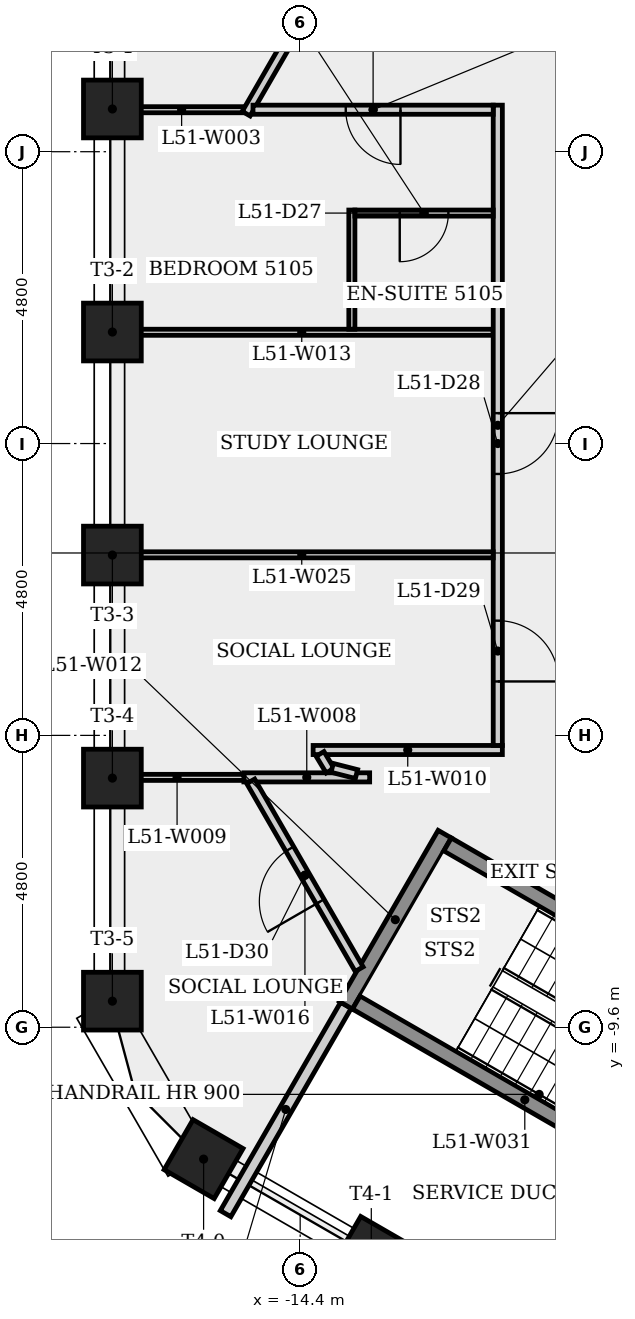
"""IFC4 building model, lengths in metres.
Left out: names, types, materials, properties, quantities, classifications, styles, units other than length and angle.
Written with IfcOpenShell. Run it as: python <this file> out.ifc"""

import sys

from ifc_helpers import new_model, si_unit, direction, frame, frame_2d, origin, origin_2d, place, context, subcontext, project, spatial, rectangle, extrude, element, fill, save


model = new_model("IFC4")
c1 = context("Model", 3, precision=1e-05, world=origin(), true_north=direction((0.0, 1.0)))
c2 = subcontext(c1, "Body", "Model", "MODEL_VIEW")
j1 = project(units=[si_unit("LENGTHUNIT", "METRE"), si_unit("PLANEANGLEUNIT", "RADIAN")], contexts=[c1])
p1 = place(None, origin())
s1 = spatial("IfcSite", under=j1, at=p1, CompositionType="ELEMENT")
p2 = place(p1, origin())
s2 = spatial("IfcBuilding", under=s1, at=p2, CompositionType="ELEMENT")
p3 = place(p2, frame((0.0, 0.0, 190.7)))
s3 = spatial("IfcBuildingStorey", under=s2, at=p3, CompositionType="ELEMENT", Elevation=190.7)
for number, where, z_axis, x_axis in (
    (1, (-17.488, 5.503, 0.0), (0.0, 0.0, 1.0), (-1.0, 0.0, 0.0)),
    (2, (-17.488, 1.834, 0.0), (0.0, 0.0, 1.0), (-1.0, 0.0, 0.0)),
    (3, (-17.488, -1.834, 0.0), (0.0, 0.0, 1.0), (-1.0, 0.0, 0.0)),
    (4, (-17.488, -5.503, 0.0), (0.0, 0.0, 1.0), (-1.0, 0.0, 0.0)),
    (5, (-17.488, -9.171, 0.0), (0.0, 0.0, 1.0), (-1.0, 0.0, 0.0)),
    (6, (-15.988, -11.769, 0.0), (0.0, 0.0, 1.0), (-0.5, -0.866, 0.0)),
    (7, (-13.23, -13.362, 0.0), (0.0, 0.0, 1.0), (-0.5, -0.866, 0.0)),
):
    element("IfcColumn", number, at=place(p3, frame(where, z_axis=z_axis, x_axis=x_axis)), inside=s3, PredefinedType="COLUMN", context=c2, shape_type="SweptSolid", body=[
        extrude(rectangle(XDim=0.95, YDim=0.95, at=origin_2d()), origin(), (0.0, 0.0, 1.0), 4.0),
    ])
p4 = place(p3, frame((-17.373, 5.49, 0.0), z_axis=(0.0, 0.0, 1.0), x_axis=(1.0, 0.0, 0.0)))
e8 = element("IfcWall", 8, at=p4, inside=s3, PredefinedType="PARTITIONING", context=c2, shape_type="SweptSolid", body=[
    extrude(rectangle(XDim=2.048, YDim=0.1, at=frame_2d((1.024, 0.0))), origin(), (0.0, 0.0, 1.0), 3.6),
])
p5 = place(p3, frame((-15.627, -12.666, 0.0), z_axis=(0.0, 0.0, 1.0), x_axis=(0.499980548326, 0.866036633923, 0.0)))
e9 = element("IfcWall", 9, at=p5, inside=s3, PredefinedType="PLUMBINGWALL", context=c2, shape_type="SweptSolid", body=[
    extrude(rectangle(XDim=3.958, YDim=0.2, at=frame_2d((1.979, 0.0))), origin(), (0.0, 0.0, 1.0), 3.6),
])
p6 = place(p3, frame((-15.288, 5.426, 0.0), z_axis=(0.0, 0.0, 1.0), x_axis=(0.499991080761, 0.866030553248, 0.0)))
e10 = element("IfcWall", 10, at=p6, inside=s3, PredefinedType="PARTITIONING", context=c2, shape_type="SweptSolid", body=[
    extrude(rectangle(XDim=6.687, YDim=0.15, at=frame_2d((3.344, 0.0))), origin(), (0.0, 0.0, 1.0), 3.6),
])
p7 = place(p3, frame((-15.326, -5.49, 0.0), z_axis=(0.0, 0.0, 1.0), x_axis=(1.0, 0.0, 0.0)))
e11 = element("IfcWall", 11, at=p7, inside=s3, PredefinedType="PARTITIONING", context=c2, shape_type="SweptSolid", body=[
    extrude(rectangle(XDim=2.069, YDim=0.15, at=frame_2d((1.034, 0.0))), origin(), (0.0, 0.0, 1.0), 3.6),
])
p8 = place(p3, frame((-15.326, -5.49, 0.0), z_axis=(0.0, 0.0, 1.0), x_axis=(-1.0, 0.0, 0.0)))
e12 = element("IfcWall", 12, at=p8, inside=s3, PredefinedType="PARTITIONING", context=c2, shape_type="SweptSolid", body=[
    extrude(rectangle(XDim=2.198, YDim=0.1, at=frame_2d((1.099, 0.0))), origin(), (0.0, 0.0, 1.0), 3.6),
])
p9 = place(p3, frame((-14.187, -5.041, 0.0), z_axis=(0.0, 0.0, 1.0), x_axis=(1.0, 0.0, 0.0)))
e13 = element("IfcWall", 13, at=p9, inside=s3, PredefinedType="PARTITIONING", context=c2, shape_type="SweptSolid", body=[
    extrude(rectangle(XDim=3.112, YDim=0.15, at=frame_2d((1.556, 0.0))), origin(), (0.0, 0.0, 1.0), 3.6),
])
p10 = place(p3, frame((-13.908, -5.379, 0.0), z_axis=(0.0, 0.0, 1.0), x_axis=(-0.516174148431, 0.856483653371, 0.0)))
e14 = element("IfcWall", 14, at=p10, inside=s3, PredefinedType="PARTITIONING", context=c2, shape_type="SweptSolid", body=[
    extrude(rectangle(XDim=0.321, YDim=0.15, at=frame_2d((0.16, 0.0))), origin(), (0.0, 0.0, 1.0), 3.6),
])
p11 = place(p3, frame((-13.648, -9.239, 0.0), z_axis=(0.0, 0.0, 1.0), x_axis=(0.500017246033, 0.866015446554, 0.0)))
e15 = element("IfcWall", 15, at=p11, inside=s3, PredefinedType="SHEAR", context=c2, shape_type="SweptSolid", body=[
    extrude(rectangle(XDim=3.25, YDim=0.25, at=frame_2d((1.625, 0.0))), origin(), (0.0, 0.0, 1.0), 3.6),
])
p12 = place(p3, frame((-17.523, 1.83, 0.0), z_axis=(0.0, 0.0, 1.0), x_axis=(1.0, 0.0, 0.0)))
e16 = element("IfcWall", 16, at=p12, inside=s3, PredefinedType="PARTITIONING", context=c2, shape_type="SweptSolid", body=[
    extrude(rectangle(XDim=6.298, YDim=0.1, at=frame_2d((3.149, 0.0))), origin(), (0.0, 0.0, 1.0), 3.6),
])
p13 = place(p3, frame((-13.55, 3.841, 0.0), z_axis=(0.0, 0.0, 1.0), x_axis=(0.0, -1.0, 0.0)))
e17 = element("IfcWall", 17, at=p13, inside=s3, PredefinedType="PARTITIONING", context=c2, shape_type="SweptSolid", body=[
    extrude(rectangle(XDim=1.96, YDim=0.1, at=frame_2d((0.98, 0.0))), origin(), (0.0, 0.0, 1.0), 3.6),
])
p14 = place(p3, frame((-13.473, -5.436, 0.0), z_axis=(0.0, 0.0, 1.0), x_axis=(-0.968736704431, 0.248091107232, 0.0)))
e18 = element("IfcWall", 18, at=p14, inside=s3, PredefinedType="PARTITIONING", context=c2, shape_type="SweptSolid", body=[
    extrude(rectangle(XDim=0.413, YDim=0.15, at=frame_2d((0.207, 0.0))), origin(), (0.0, 0.0, 1.0), 3.6),
])
p15 = place(p3, frame((-13.43, -8.645, 0.0), z_axis=(0.0, 0.0, 1.0), x_axis=(-0.499959432603, 0.866048824115, 0.0)))
e19 = element("IfcWall", 19, at=p15, inside=s3, PredefinedType="PARTITIONING", context=c2, shape_type="SweptSolid", body=[
    extrude(rectangle(XDim=3.567, YDim=0.15, at=frame_2d((1.784, 0.0))), origin(), (0.0, 0.0, 1.0), 3.6),
])
p16 = place(p15, frame((1.284, 0.0, 0.0)))
e20 = element("IfcOpeningElement", 20, at=p16, cuts=e19, PredefinedType="OPENING", context=c2, shape_type="SweptSolid", body=[
    extrude(rectangle(XDim=1.0, YDim=2.1, at=frame_2d((0.5, 1.05))), frame((0.0, 0.085, 0.0), z_axis=(0.0, -1.0, 0.0), x_axis=(1.0, 0.0, 0.0)), (0.0, 0.0, 1.0), 0.17),
])
p17 = place(p3, frame((-11.977, -6.595, 0.0), z_axis=(0.0, 0.0, 1.0), x_axis=(0.866025499775, -0.499999833739, 0.0)))
e21 = element("IfcWall", 21, at=p17, inside=s3, PredefinedType="SHEAR", context=c2, shape_type="SweptSolid", body=[
    extrude(rectangle(XDim=6.4, YDim=0.25, at=frame_2d((3.2, 0.0))), origin(), (0.0, 0.0, 1.0), 3.6),
])
p18 = place(p17, frame((5.025, 0.0, 0.0)))
e22 = element("IfcOpeningElement", 22, at=p18, cuts=e21, PredefinedType="OPENING", context=c2, shape_type="SweptSolid", body=[
    extrude(rectangle(XDim=1.0, YDim=2.1, at=frame_2d((0.5, 1.05))), frame((0.0, 0.135, 0.0), z_axis=(0.0, -1.0, 0.0), x_axis=(1.0, 0.0, 0.0)), (0.0, 0.0, 1.0), 0.27),
])
p19 = place(p3, frame((-11.15, 5.565, 0.0), z_axis=(0.0, 0.0, 1.0), x_axis=(0.0, -1.0, 0.0)))
e23 = element("IfcWall", 23, at=p19, inside=s3, PredefinedType="PARTITIONING", context=c2, shape_type="SweptSolid", body=[
    extrude(rectangle(XDim=10.531, YDim=0.15, at=frame_2d((5.266, 0.0))), origin(), (0.0, 0.0, 1.0), 3.6),
])
p20 = place(p19, frame((5.065, 0.0, 0.0)))
e24 = element("IfcOpeningElement", 24, at=p20, cuts=e23, PredefinedType="OPENING", context=c2, shape_type="SweptSolid", body=[
    extrude(rectangle(XDim=1.0, YDim=2.1, at=frame_2d((0.5, 1.05))), frame((0.0, 0.085, 0.0), z_axis=(0.0, -1.0, 0.0), x_axis=(1.0, 0.0, 0.0)), (0.0, 0.0, 1.0), 0.17),
])
p21 = place(p19, frame((8.479, 0.0, 0.0)))
e25 = element("IfcOpeningElement", 25, at=p21, cuts=e23, PredefinedType="OPENING", context=c2, shape_type="SweptSolid", body=[
    extrude(rectangle(XDim=1.0, YDim=2.1, at=frame_2d((0.5, 1.05))), frame((0.0, 0.085, 0.0), z_axis=(0.0, -1.0, 0.0), x_axis=(1.0, 0.0, 0.0)), (0.0, 0.0, 1.0), 0.17),
])
p22 = place(p3, frame((-11.225, 3.791, 0.0), z_axis=(0.0, 0.0, 1.0), x_axis=(-1.0, 0.0, 0.0)))
e26 = element("IfcWall", 26, at=p22, inside=s3, PredefinedType="PARTITIONING", context=c2, shape_type="SweptSolid", body=[
    extrude(rectangle(XDim=2.275, YDim=0.1, at=frame_2d((1.137, 0.0))), origin(), (0.0, 0.0, 1.0), 3.6),
])
p23 = place(p22, frame((0.738, 0.0, 0.0)))
e27 = element("IfcOpeningElement", 27, at=p23, cuts=e26, PredefinedType="OPENING", context=c2, shape_type="SweptSolid", body=[
    extrude(rectangle(XDim=0.8, YDim=2.1, at=frame_2d((0.4, 1.05))), frame((0.0, 0.06, 0.0), z_axis=(0.0, -1.0, 0.0), x_axis=(1.0, 0.0, 0.0)), (0.0, 0.0, 1.0), 0.12),
])
p24 = place(p3, frame((-11.225, 5.49, 0.0), z_axis=(0.0, 0.0, 1.0), x_axis=(-1.0, 0.0, 0.0)))
e28 = element("IfcWall", 28, at=p24, inside=s3, PredefinedType="PARTITIONING", context=c2, shape_type="SweptSolid", body=[
    extrude(rectangle(XDim=3.951, YDim=0.15, at=frame_2d((1.975, 0.0))), origin(), (0.0, 0.0, 1.0), 3.6),
])
p25 = place(p24, frame((1.525, 0.0, 0.0)))
e29 = element("IfcOpeningElement", 29, at=p25, cuts=e28, PredefinedType="OPENING", context=c2, shape_type="SweptSolid", body=[
    extrude(rectangle(XDim=0.9, YDim=2.1, at=frame_2d((0.45, 1.05))), frame((0.0, 0.085, 0.0), z_axis=(0.0, -1.0, 0.0), x_axis=(1.0, 0.0, 0.0)), (0.0, 0.0, 1.0), 0.17),
])
p26 = place(p3, frame((-11.225, -1.83, 0.0), z_axis=(0.0, 0.0, 1.0), x_axis=(-1.0, 0.0, 0.0)))
e30 = element("IfcWall", 30, at=p26, inside=s3, PredefinedType="PARTITIONING", context=c2, shape_type="SweptSolid", body=[
    extrude(rectangle(XDim=6.298, YDim=0.1, at=frame_2d((3.149, 0.0))), origin(), (0.0, 0.0, 1.0), 3.6),
])
p27 = place(p3, frame((-7.935, -12.393, 0.0), z_axis=(0.0, 0.0, 1.0), x_axis=(-0.866025499775, 0.499999833739, 0.0)))
e31 = element("IfcWall", 31, at=p27, inside=s3, PredefinedType="SHEAR", context=c2, shape_type="SweptSolid", body=[
    extrude(rectangle(XDim=6.4, YDim=0.25, at=frame_2d((3.2, 0.0))), origin(), (0.0, 0.0, 1.0), 3.6),
])
p28 = place(p25, origin())
e32 = element("IfcDoor", 32, at=p28, inside=s3, OperationType="SINGLE_SWING_LEFT", PredefinedType="DOOR", context=c2, shape_type="SweptSolid", body=[
    extrude(rectangle(XDim=0.9, YDim=2.1, at=frame_2d((0.45, 1.05))), frame((0.0, 0.025, 0.0), z_axis=(0.0, -1.0, 0.0), x_axis=(1.0, 0.0, 0.0)), (0.0, 0.0, 1.0), 0.05),
])
fill(e29, e32)
p29 = place(p23, origin())
e33 = element("IfcDoor", 33, at=p29, inside=s3, OperationType="SINGLE_SWING_RIGHT", PredefinedType="DOOR", context=c2, shape_type="SweptSolid", body=[
    extrude(rectangle(XDim=0.8, YDim=2.1, at=frame_2d((0.4, 1.05))), frame((0.0, 0.025, 0.0), z_axis=(0.0, -1.0, 0.0), x_axis=(1.0, 0.0, 0.0)), (0.0, 0.0, 1.0), 0.05),
])
fill(e27, e33)
p30 = place(p20, origin())
e34 = element("IfcDoor", 34, at=p30, inside=s3, OperationType="SINGLE_SWING_LEFT", PredefinedType="DOOR", context=c2, shape_type="SweptSolid", body=[
    extrude(rectangle(XDim=1.0, YDim=2.1, at=frame_2d((0.5, 1.05))), frame((0.0, 0.025, 0.0), z_axis=(0.0, -1.0, 0.0), x_axis=(1.0, 0.0, 0.0)), (0.0, 0.0, 1.0), 0.05),
])
fill(e24, e34)
p31 = place(p21, origin())
e35 = element("IfcDoor", 35, at=p31, inside=s3, OperationType="SINGLE_SWING_RIGHT", PredefinedType="DOOR", context=c2, shape_type="SweptSolid", body=[
    extrude(rectangle(XDim=1.0, YDim=2.1, at=frame_2d((0.5, 1.05))), frame((0.0, 0.025, 0.0), z_axis=(0.0, -1.0, 0.0), x_axis=(1.0, 0.0, 0.0)), (0.0, 0.0, 1.0), 0.05),
])
fill(e25, e35)
p32 = place(p16, origin())
e36 = element("IfcDoor", 36, at=p32, inside=s3, OperationType="SINGLE_SWING_LEFT", PredefinedType="DOOR", context=c2, shape_type="SweptSolid", body=[
    extrude(rectangle(XDim=1.0, YDim=2.1, at=frame_2d((0.5, 1.05))), frame((0.0, 0.025, 0.0), z_axis=(0.0, -1.0, 0.0), x_axis=(1.0, 0.0, 0.0)), (0.0, 0.0, 1.0), 0.05),
])
fill(e20, e36)
save(model, sys.argv[1])
